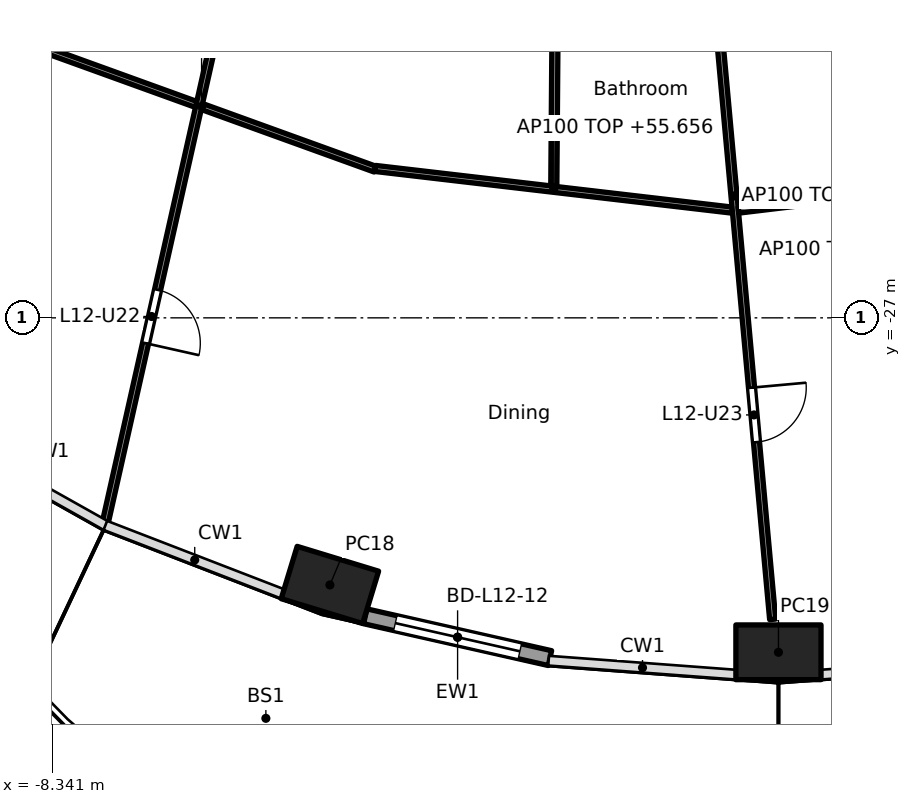
"""IFC4 building model, lengths in metres.
Left out: names, types, materials, properties, quantities, classifications, styles, units other than length and angle.
Written with IfcOpenShell. Run it as: python <this file> out.ifc"""

import sys

from ifc_helpers import new_model, si_unit, direction, frame, frame_2d, origin, origin_2d, place, context, subcontext, project, spatial, rectangle, hollow_rectangle, extrude, element, fill, save


model = new_model("IFC4")
c1 = context("Model", 3, precision=1e-05, world=origin(), true_north=direction((0.0, 1.0)))
c2 = subcontext(c1, "Body", "Model", "MODEL_VIEW")
j1 = project(units=[si_unit("LENGTHUNIT", "METRE"), si_unit("PLANEANGLEUNIT", "RADIAN")], contexts=[c1])
p1 = place(None, origin())
s1 = spatial("IfcSite", under=j1, at=p1, CompositionType="ELEMENT")
p2 = place(p1, origin())
s2 = spatial("IfcBuilding", under=s1, at=p2, CompositionType="ELEMENT")
p3 = place(p2, frame((0.0, 0.0, 52.9)))
s3 = spatial("IfcBuildingStorey", under=s2, at=p3, CompositionType="ELEMENT", Elevation=52.9)
for number, where, z_axis, x_axis in (
    (1, (-3.776, -31.393, 0.0), (0.0, 0.0, 1.0), (0.957, -0.292, 0.0)),
    (2, (3.6, -32.5, 0.0), (0.0, 0.0, 1.0), (1.0, 0.0, 0.0)),
):
    element("IfcColumn", number, at=place(p3, frame(where, z_axis=z_axis, x_axis=x_axis)), inside=s3, PredefinedType="COLUMN", context=c2, shape_type="SweptSolid", body=[
        extrude(hollow_rectangle(XDim=1.4, YDim=0.9, WallThickness=0.05, at=origin_2d()), origin(), (0.0, 0.0, 1.0), 3.7),
    ])
p4 = place(p3, frame((-0.158, -32.596, 0.0), z_axis=(0.0, 0.0, 1.0), x_axis=(-0.975331134677, 0.220746863466, 0.0)))
e3 = element("IfcWall", 3, at=p4, inside=s3, PredefinedType="SOLIDWALL", context=c2, shape_type="SweptSolid", body=[
    extrude(rectangle(XDim=3.115, YDim=0.25, at=frame_2d((1.557, 0.0))), origin(), (0.0, 0.0, 1.0), 3.44),
])
p5 = place(p4, frame((0.507, 0.0, 0.0)))
e4 = element("IfcOpeningElement", 4, at=p5, cuts=e3, PredefinedType="OPENING", context=c2, shape_type="SweptSolid", body=[
    extrude(rectangle(XDim=2.1, YDim=2.4, at=frame_2d((1.05, 1.2))), frame((0.0, 0.135, 0.0), z_axis=(0.0, -1.0, 0.0), x_axis=(1.0, 0.0, 0.0)), (0.0, 0.0, 1.0), 0.27),
])
p6 = place(p3, frame((-8.739, -22.491, 0.0), z_axis=(0.0, 0.0, 1.0), x_axis=(0.940401691072, -0.340065669288, 0.0)))
e5 = element("IfcWall", 5, at=p6, inside=s3, PredefinedType="PARTITIONING", context=c2, shape_type="SweptSolid", body=[
    extrude(rectangle(XDim=6.067, YDim=0.1, at=frame_2d((3.034, 0.0))), origin(), (0.0, 0.0, 1.0), 2.756),
])
p7 = place(p3, frame((-3.492, -12.662, 0.0), z_axis=(0.0, 0.0, 1.0), x_axis=(-0.219268088006, -0.975664648115, 0.0)))
e6 = element("IfcWall", 6, at=p7, inside=s3, PredefinedType="PARTITIONING", context=c2, shape_type="SweptSolid", body=[
    extrude(rectangle(XDim=18.23, YDim=0.1, at=frame_2d((9.115, 0.0))), origin(), (0.0, 0.0, 1.0), 2.687),
])
p8 = place(p7, frame((0.35, 0.0, 0.0)))
e7 = element("IfcOpeningElement", 7, at=p8, cuts=e6, PredefinedType="OPENING", context=c2, shape_type="SweptSolid", body=[
    extrude(rectangle(XDim=0.9, YDim=2.1, at=frame_2d((0.45, 1.05))), frame((0.0, 0.06, 0.0), z_axis=(0.0, -1.0, 0.0), x_axis=(1.0, 0.0, 0.0)), (0.0, 0.0, 1.0), 0.12),
])
p9 = place(p7, frame((7.497, 0.0, 0.0)))
e8 = element("IfcOpeningElement", 8, at=p9, cuts=e6, PredefinedType="OPENING", context=c2, shape_type="SweptSolid", body=[
    extrude(rectangle(XDim=0.9, YDim=2.1, at=frame_2d((0.45, 1.05))), frame((0.0, 0.06, 0.0), z_axis=(0.0, -1.0, 0.0), x_axis=(1.0, 0.0, 0.0)), (0.0, 0.0, 1.0), 0.12),
])
p10 = place(p7, frame((14.223, 0.0, 0.0)))
e9 = element("IfcOpeningElement", 9, at=p10, cuts=e6, PredefinedType="OPENING", context=c2, shape_type="SweptSolid", body=[
    extrude(rectangle(XDim=0.9, YDim=2.1, at=frame_2d((0.45, 1.05))), frame((0.0, 0.06, 0.0), z_axis=(0.0, -1.0, 0.0), x_axis=(1.0, 0.0, 0.0)), (0.0, 0.0, 1.0), 0.12),
])
p11 = place(p3, frame((-3.031, -24.543, 0.0), z_axis=(0.0, 0.0, 1.0), x_axis=(0.993255612046, -0.115945198862, 0.0)))
e10 = element("IfcWall", 10, at=p11, inside=s3, PredefinedType="PARTITIONING", context=c2, shape_type="SweptSolid", body=[
    extrude(rectangle(XDim=5.913, YDim=0.1, at=frame_2d((2.956, 0.0))), origin(), (0.0, 0.0, 1.0), 2.756),
])
p12 = place(p3, frame((-0.001, -12.665, 0.0), z_axis=(0.0, 0.0, 1.0), x_axis=(-0.007702417287, -0.999970335944, 0.0)))
e11 = element("IfcWall", 11, at=p12, inside=s3, PredefinedType="PARTITIONING", context=c2, shape_type="SweptSolid", body=[
    extrude(rectangle(XDim=12.171, YDim=0.1, at=frame_2d((6.086, 0.0))), origin(), (0.0, 0.0, 1.0), 2.687),
])
p13 = place(p12, frame((2.183, 0.0, 0.0)))
e12 = element("IfcOpeningElement", 12, at=p13, cuts=e11, PredefinedType="OPENING", context=c2, shape_type="SweptSolid", body=[
    extrude(rectangle(XDim=0.9, YDim=2.1, at=frame_2d((0.45, 1.05))), frame((0.0, 0.06, 0.0), z_axis=(0.0, -1.0, 0.0), x_axis=(1.0, 0.0, 0.0)), (0.0, 0.0, 1.0), 0.12),
])
p14 = place(p12, frame((8.269, 0.0, 0.0)))
e13 = element("IfcOpeningElement", 13, at=p14, cuts=e11, PredefinedType="OPENING", context=c2, shape_type="SweptSolid", body=[
    extrude(rectangle(XDim=0.9, YDim=2.1, at=frame_2d((0.45, 1.05))), frame((0.0, 0.06, 0.0), z_axis=(0.0, -1.0, 0.0), x_axis=(1.0, 0.0, 0.0)), (0.0, 0.0, 1.0), 0.12),
])
p15 = place(p3, frame((2.234, -18.032, 0.0), z_axis=(0.0, 0.0, 1.0), x_axis=(0.090891502968, -0.995860800859, 0.0)))
e14 = element("IfcWall", 14, at=p15, inside=s3, PredefinedType="PARTITIONING", context=c2, shape_type="SweptSolid", body=[
    extrude(rectangle(XDim=13.984, YDim=0.1, at=frame_2d((6.992, 0.0))), origin(), (0.0, 0.0, 1.0), 2.756),
])
p16 = place(p15, frame((10.158, 0.0, 0.0)))
e15 = element("IfcOpeningElement", 15, at=p16, cuts=e14, PredefinedType="OPENING", context=c2, shape_type="SweptSolid", body=[
    extrude(rectangle(XDim=0.9, YDim=2.1, at=frame_2d((0.45, 1.05))), frame((0.0, 0.06, 0.0), z_axis=(0.0, -1.0, 0.0), x_axis=(1.0, 0.0, 0.0)), (0.0, 0.0, 1.0), 0.12),
])
p17 = place(p3, frame((2.941, -25.229, 0.0), z_axis=(0.0, 0.0, 1.0), x_axis=(0.992834127896, 0.119500604542, 0.0)))
e16 = element("IfcWall", 16, at=p17, inside=s3, PredefinedType="PARTITIONING", context=c2, shape_type="SweptSolid", body=[
    extrude(rectangle(XDim=5.959, YDim=0.1, at=frame_2d((2.98, 0.0))), origin(), (0.0, 0.0, 1.0), 2.756),
])
p18 = place(p5, origin())
e17 = element("IfcDoor", 17, at=p18, inside=s3, OperationType="SLIDING_TO_LEFT", PredefinedType="DOOR", context=c2, shape_type="SweptSolid", body=[
    extrude(rectangle(XDim=2.1, YDim=2.4, at=frame_2d((1.05, 1.2))), frame((0.0, 0.025, 0.0), z_axis=(0.0, -1.0, 0.0), x_axis=(1.0, 0.0, 0.0)), (0.0, 0.0, 1.0), 0.05),
])
fill(e4, e17)
p19 = place(p10, origin())
e18 = element("IfcDoor", 18, at=p19, inside=s3, OperationType="SINGLE_SWING_RIGHT", PredefinedType="DOOR", context=c2, shape_type="SweptSolid", body=[
    extrude(rectangle(XDim=0.9, YDim=2.1, at=frame_2d((0.45, 1.05))), frame((0.0, 0.025, 0.0), z_axis=(0.0, -1.0, 0.0), x_axis=(1.0, 0.0, 0.0)), (0.0, 0.0, 1.0), 0.05),
])
fill(e9, e18)
p20 = place(p16, origin())
e19 = element("IfcDoor", 19, at=p20, inside=s3, OperationType="SINGLE_SWING_LEFT", PredefinedType="DOOR", context=c2, shape_type="SweptSolid", body=[
    extrude(rectangle(XDim=0.9, YDim=2.1, at=frame_2d((0.45, 1.05))), frame((0.0, 0.025, 0.0), z_axis=(0.0, -1.0, 0.0), x_axis=(1.0, 0.0, 0.0)), (0.0, 0.0, 1.0), 0.05),
])
fill(e15, e19)
save(model, sys.argv[1])
